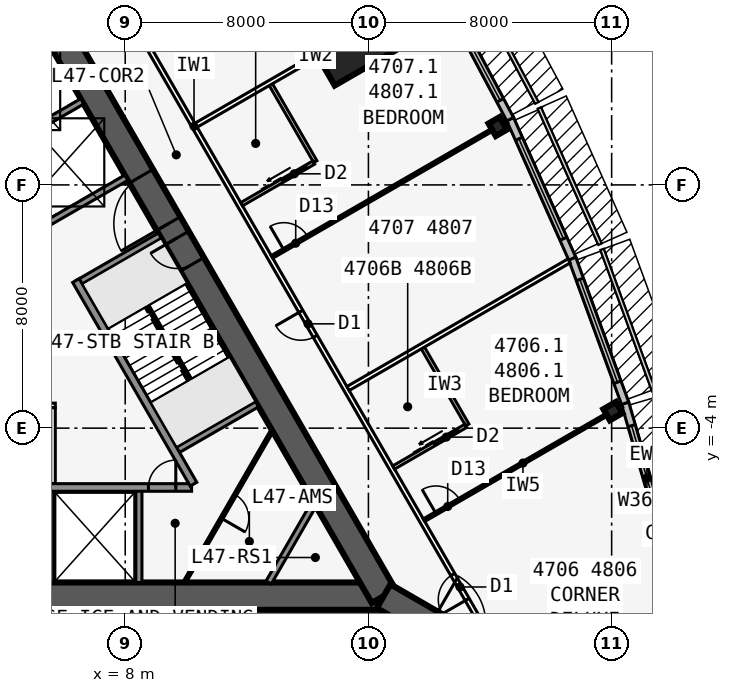
"""IFC4 building model, lengths in metres.
Left out: names, types, materials, properties, quantities, classifications, styles, units other than length and angle.
Written with IfcOpenShell. Run it as: python <this file> out.ifc"""

import sys

from ifc_helpers import new_model, si_unit, direction, frame, frame_2d, origin, origin_2d, place, context, subcontext, project, spatial, rectangle, i_section, extrude, element, fill, save


model = new_model("IFC4")
c1 = context("Model", 3, precision=1e-05, world=origin(), true_north=direction((0.0, 1.0)))
c2 = subcontext(c1, "Body", "Model", "MODEL_VIEW")
j1 = project(units=[si_unit("LENGTHUNIT", "METRE"), si_unit("PLANEANGLEUNIT", "RADIAN")], contexts=[c1])
p1 = place(None, origin())
s1 = spatial("IfcSite", under=j1, at=p1, CompositionType="ELEMENT")
p2 = place(p1, origin())
s2 = spatial("IfcBuilding", under=s1, at=p2, CompositionType="ELEMENT")
p3 = place(p2, frame((0.0, 0.0, 175.9)))
s3 = spatial("IfcBuildingStorey", under=s2, at=p3, CompositionType="ELEMENT", Elevation=175.9)
p4 = place(p3, frame((-16.5, -9.526, 0.0), z_axis=(0.0, 0.0, 1.0), x_axis=(1.0, 0.0, 0.0)))
e1 = element("IfcWall", 1, at=p4, inside=s3, PredefinedType="SHEAR", context=c2, shape_type="SweptSolid", body=[
    extrude(rectangle(XDim=33.0, YDim=0.9, at=frame_2d((16.5, 0.0))), origin(), (0.0, 0.0, 1.0), 3.4),
])
p5 = place(p4, frame((14.05, 0.0, 0.0)))
e2 = element("IfcOpeningElement", 2, at=p5, cuts=e1, PredefinedType="OPENING", context=c2, shape_type="SweptSolid", body=[
    extrude(rectangle(XDim=1.8, YDim=2.13, at=frame_2d((0.9, 1.065))), frame((0.0, 0.46, 0.0), z_axis=(0.0, -1.0, 0.0), x_axis=(1.0, 0.0, 0.0)), (0.0, 0.0, 1.0), 0.92),
])
p6 = place(p3, frame((-0.55, -5.951, 0.0), z_axis=(0.0, 0.0, 1.0), x_axis=(1.0, 0.0, 0.0)))
e3 = element("IfcWall", 3, at=p6, inside=s3, PredefinedType="SOLIDWALL", context=c2, shape_type="SweptSolid", body=[
    extrude(rectangle(XDim=10.733, YDim=0.25, at=frame_2d((5.366, 0.0))), origin(), (0.0, 0.0, 1.0), 3.235),
])
p7 = place(p6, frame((9.314, 0.0, 0.0)))
e4 = element("IfcOpeningElement", 4, at=p7, cuts=e3, PredefinedType="OPENING", context=c2, shape_type="SweptSolid", body=[
    extrude(rectangle(XDim=0.9, YDim=2.13, at=frame_2d((0.45, 1.065))), frame((0.0, 0.135, 0.0), z_axis=(0.0, -1.0, 0.0), x_axis=(1.0, 0.0, 0.0)), (0.0, 0.0, 1.0), 0.27),
])
p8 = place(p6, frame((1.05, 0.0, 0.0)))
e5 = element("IfcOpeningElement", 5, at=p8, cuts=e3, PredefinedType="OPENING", context=c2, shape_type="SweptSolid", body=[
    extrude(rectangle(XDim=1.1, YDim=2.13, at=frame_2d((0.55, 1.065))), frame((0.0, 0.135, 0.0), z_axis=(0.0, -1.0, 0.0), x_axis=(1.0, 0.0, 0.0)), (0.0, 0.0, 1.0), 0.27),
])
p9 = place(p6, frame((4.05, 0.0, 0.0)))
e6 = element("IfcOpeningElement", 6, at=p9, cuts=e3, PredefinedType="OPENING", context=c2, shape_type="SweptSolid", body=[
    extrude(rectangle(XDim=1.1, YDim=2.13, at=frame_2d((0.55, 1.065))), frame((0.0, 0.135, 0.0), z_axis=(0.0, -1.0, 0.0), x_axis=(1.0, 0.0, 0.0)), (0.0, 0.0, 1.0), 0.27),
])
for number, where, z_axis, x_axis in (
    (7, (5.55, -5.951, 0.0), (0.0, 0.0, 1.0), (0.0, -1.0, 0.0)),
    (8, (8.45, -5.951, 0.0), (0.0, 0.0, 1.0), (0.0, -1.0, 0.0)),
):
    element("IfcWall", number, at=place(p3, frame(where, z_axis=z_axis, x_axis=x_axis)), inside=s3, PredefinedType="SOLIDWALL", context=c2, shape_type="SweptSolid", body=[
        extrude(rectangle(XDim=3.125, YDim=0.2, at=frame_2d((1.562, 0.0))), origin(), (0.0, 0.0, 1.0), 3.235),
    ])
p10 = place(p3, frame((16.5, -9.526, 0.0), z_axis=(0.0, 0.0, 1.0), x_axis=(-0.499999749417, 0.866025548458, 0.0)))
e9 = element("IfcWall", 9, at=p10, inside=s3, PredefinedType="SHEAR", context=c2, shape_type="SweptSolid", body=[
    extrude(rectangle(XDim=33.0, YDim=0.9, at=frame_2d((16.5, 0.0))), origin(), (0.0, 0.0, 1.0), 3.4),
])
p11 = place(p10, frame((14.15, 0.0, 0.0)))
e10 = element("IfcOpeningElement", 10, at=p11, cuts=e9, PredefinedType="OPENING", context=c2, shape_type="SweptSolid", body=[
    extrude(rectangle(XDim=1.8, YDim=2.13, at=frame_2d((0.9, 1.065))), frame((0.0, 0.46, 0.0), z_axis=(0.0, -1.0, 0.0), x_axis=(1.0, 0.0, 0.0)), (0.0, 0.0, 1.0), 0.92),
])
p12 = place(p10, frame((12.6, 0.0, 0.0)))
e11 = element("IfcOpeningElement", 11, at=p12, cuts=e9, PredefinedType="OPENING", context=c2, shape_type="SweptSolid", body=[
    extrude(rectangle(XDim=1.0, YDim=2.13, at=frame_2d((0.5, 1.065))), frame((0.0, 0.46, 0.0), z_axis=(0.0, -1.0, 0.0), x_axis=(1.0, 0.0, 0.0)), (0.0, 0.0, 1.0), 0.92),
])
p13 = place(p3, frame((10.245, -5.843, 0.0), z_axis=(0.0, 0.0, 1.0), x_axis=(-0.499993009313, 0.866029439822, 0.0)))
e12 = element("IfcWall", 12, at=p13, inside=s3, PredefinedType="SOLIDWALL", context=c2, shape_type="SweptSolid", body=[
    extrude(rectangle(XDim=7.733, YDim=0.25, at=frame_2d((3.866, 0.0))), origin(), (0.0, 0.0, 1.0), 3.235),
])
for number, where, z_axis, x_axis in (
    (13, (9.629, -4.775, 0.0), (0.0, 0.0, 1.0), (0.866, 0.5, 0.0)),
    (14, (6.429, 0.767, 0.0), (0.0, 0.0, 1.0), (0.866, 0.5, 0.0)),
    (15, (5.329, 2.673, 0.0), (0.0, 0.0, 1.0), (0.866, 0.5, 0.0)),
    (16, (3.879, 5.184, 0.0), (0.0, 0.0, 1.0), (0.866, 0.5, 0.0)),
):
    element("IfcWall", number, at=place(p3, frame(where, z_axis=z_axis, x_axis=x_axis)), inside=s3, PredefinedType="SOLIDWALL", context=c2, shape_type="SweptSolid", body=[
        extrude(rectangle(XDim=3.125, YDim=0.2, at=frame_2d((1.562, 0.0))), origin(), (0.0, 0.0, 1.0), 3.235),
    ])
p14 = place(p3, frame((16.5, -9.526, 0.0), z_axis=(0.0, 0.0, 1.0), x_axis=(0.866031398331, -0.499989616998, 0.0)))
e17 = element("IfcWall", 17, at=p14, inside=s3, PredefinedType="SHEAR", context=c2, shape_type="SweptSolid", body=[
    extrude(rectangle(XDim=4.746, YDim=0.9, at=frame_2d((2.373, 0.0))), origin(), (0.0, 0.0, 1.0), 3.4),
])
p15 = place(p14, frame((1.8, 0.0, 0.0)))
e18 = element("IfcOpeningElement", 18, at=p15, cuts=e17, PredefinedType="OPENING", context=c2, shape_type="SweptSolid", body=[
    extrude(rectangle(XDim=1.8, YDim=2.13, at=frame_2d((0.9, 1.065))), frame((0.0, 0.46, 0.0), z_axis=(0.0, -1.0, 0.0), x_axis=(1.0, 0.0, 0.0)), (0.0, 0.0, 1.0), 0.92),
])
for number, where, z_axis, x_axis in (
    (19, (24.041, -3.44, 0.0), (0.0, 0.0, 1.0), (-0.5, 0.866, 0.0)),
    (20, (20.254, 5.92, 0.0), (0.0, 0.0, 1.0), (0.866, 0.5, 0.0)),
):
    element("IfcColumn", number, at=place(p3, frame(where, z_axis=z_axis, x_axis=x_axis)), inside=s3, PredefinedType="COLUMN", context=c2, shape_type="SweptSolid", body=[
        extrude(i_section(OverallWidth=0.424, OverallDepth=0.475, WebThickness=0.048, FlangeThickness=0.077, at=origin_2d()), origin(), (0.0, 0.0, 1.0), 3.4),
    ])
p16 = place(p3, frame((15.312, 8.84, 0.0), z_axis=(0.0, 0.0, 1.0), x_axis=(0.866025403784, 0.5, 0.0)))
e21 = element("IfcColumn", 21, at=p16, inside=s3, PredefinedType="COLUMN", context=c2, shape_type="SweptSolid", body=[
    extrude(rectangle(XDim=2.3, YDim=2.3, at=origin_2d()), origin(), (0.0, 0.0, 1.0), 3.4),
])
p17 = place(p3, frame((25.88, -8.118, 0.0), z_axis=(0.0, 0.0, 1.0), x_axis=(-0.279528287117, 0.960137457191, 0.0)))
e22 = element("IfcWall", 22, at=p17, inside=s3, PredefinedType="STANDARD", context=c2, shape_type="SweptSolid", body=[
    extrude(rectangle(XDim=5.148, YDim=0.25, at=frame_2d((2.574, 0.0))), origin(), (0.0, 0.0, 1.0), 3.235),
])
p18 = place(p17, frame((0.774, 0.0, 0.45)))
e23 = element("IfcOpeningElement", 23, at=p18, cuts=e22, PredefinedType="OPENING", context=c2, shape_type="SweptSolid", body=[
    extrude(rectangle(XDim=3.6, YDim=2.4, at=frame_2d((1.8, 1.2))), frame((0.0, 0.135, 0.0), z_axis=(0.0, -1.0, 0.0), x_axis=(1.0, 0.0, 0.0)), (0.0, 0.0, 1.0), 0.27),
])
p19 = place(p3, frame((24.444, -3.183, 0.0), z_axis=(0.0, 0.0, 1.0), x_axis=(-0.343225593282, 0.939252996863, 0.0)))
e24 = element("IfcWall", 24, at=p19, inside=s3, PredefinedType="STANDARD", context=c2, shape_type="SweptSolid", body=[
    extrude(rectangle(XDim=5.076, YDim=0.25, at=frame_2d((2.538, 0.0))), origin(), (0.0, 0.0, 1.0), 3.235),
])
p20 = place(p19, frame((0.738, 0.0, 0.45)))
e25 = element("IfcOpeningElement", 25, at=p20, cuts=e24, PredefinedType="OPENING", context=c2, shape_type="SweptSolid", body=[
    extrude(rectangle(XDim=3.6, YDim=2.4, at=frame_2d((1.8, 1.2))), frame((0.0, 0.135, 0.0), z_axis=(0.0, -1.0, 0.0), x_axis=(1.0, 0.0, 0.0)), (0.0, 0.0, 1.0), 0.27),
])
p21 = place(p3, frame((22.705, 1.576, 0.0), z_axis=(0.0, 0.0, 1.0), x_axis=(-0.406832200364, 0.913502906808, 0.0)))
e26 = element("IfcWall", 26, at=p21, inside=s3, PredefinedType="STANDARD", context=c2, shape_type="SweptSolid", body=[
    extrude(rectangle(XDim=5.028, YDim=0.25, at=frame_2d((2.514, 0.0))), origin(), (0.0, 0.0, 1.0), 3.235),
])
p22 = place(p21, frame((0.714, 0.0, 0.45)))
e27 = element("IfcOpeningElement", 27, at=p22, cuts=e26, PredefinedType="OPENING", context=c2, shape_type="SweptSolid", body=[
    extrude(rectangle(XDim=3.6, YDim=2.4, at=frame_2d((1.8, 1.2))), frame((0.0, 0.135, 0.0), z_axis=(0.0, -1.0, 0.0), x_axis=(1.0, 0.0, 0.0)), (0.0, 0.0, 1.0), 0.27),
])
p23 = place(p3, frame((20.663, 6.161, 0.0), z_axis=(0.0, 0.0, 1.0), x_axis=(-0.469404966864, 0.882982999317, 0.0)))
e28 = element("IfcWall", 28, at=p23, inside=s3, PredefinedType="STANDARD", context=c2, shape_type="SweptSolid", body=[
    extrude(rectangle(XDim=5.003, YDim=0.25, at=frame_2d((2.501, 0.0))), origin(), (0.0, 0.0, 1.0), 3.235),
])
p24 = place(p23, frame((0.701, 0.0, 0.45)))
e29 = element("IfcOpeningElement", 29, at=p24, cuts=e28, PredefinedType="OPENING", context=c2, shape_type="SweptSolid", body=[
    extrude(rectangle(XDim=3.6, YDim=2.4, at=frame_2d((1.8, 1.2))), frame((0.0, 0.135, 0.0), z_axis=(0.0, -1.0, 0.0), x_axis=(1.0, 0.0, 0.0)), (0.0, 0.0, 1.0), 0.27),
])
p25 = place(p3, frame((20.027, -10.985, 0.0), z_axis=(0.0, 0.0, 1.0), x_axis=(-0.500001677587, 0.866024435227, 0.0)))
e30 = element("IfcWall", 30, at=p25, inside=s3, PredefinedType="PARTITIONING", context=c2, shape_type="SweptSolid", body=[
    extrude(rectangle(XDim=39.054, YDim=0.15, at=frame_2d((19.527, 0.0))), origin(), (0.0, 0.0, 1.0), 3.235),
])
p26 = place(p25, frame((1.558, 0.0, 0.0)))
e31 = element("IfcOpeningElement", 31, at=p26, cuts=e30, PredefinedType="OPENING", context=c2, shape_type="SweptSolid", body=[
    extrude(rectangle(XDim=0.95, YDim=2.13, at=frame_2d((0.475, 1.065))), frame((0.0, 0.085, 0.0), z_axis=(0.0, -1.0, 0.0), x_axis=(1.0, 0.0, 0.0)), (0.0, 0.0, 1.0), 0.17),
])
p27 = place(p25, frame((11.552, 0.0, 0.0)))
e32 = element("IfcOpeningElement", 32, at=p27, cuts=e30, PredefinedType="OPENING", context=c2, shape_type="SweptSolid", body=[
    extrude(rectangle(XDim=0.95, YDim=2.13, at=frame_2d((0.475, 1.065))), frame((0.0, 0.085, 0.0), z_axis=(0.0, -1.0, 0.0), x_axis=(1.0, 0.0, 0.0)), (0.0, 0.0, 1.0), 0.17),
])
p28 = place(p25, frame((25.352, 0.0, 0.0)))
e33 = element("IfcOpeningElement", 33, at=p28, cuts=e30, PredefinedType="OPENING", context=c2, shape_type="SweptSolid", body=[
    extrude(rectangle(XDim=0.95, YDim=2.13, at=frame_2d((0.475, 1.065))), frame((0.0, 0.085, 0.0), z_axis=(0.0, -1.0, 0.0), x_axis=(1.0, 0.0, 0.0)), (0.0, 0.0, 1.0), 0.17),
])
p29 = place(p25, frame((36.546, 0.0, 0.0)))
e34 = element("IfcOpeningElement", 34, at=p29, cuts=e30, PredefinedType="OPENING", context=c2, shape_type="SweptSolid", body=[
    extrude(rectangle(XDim=0.95, YDim=2.13, at=frame_2d((0.475, 1.065))), frame((0.0, 0.085, 0.0), z_axis=(0.0, -1.0, 0.0), x_axis=(1.0, 0.0, 0.0)), (0.0, 0.0, 1.0), 0.17),
])
p30 = place(p3, frame((17.829, -7.027, 0.0), z_axis=(0.0, 0.0, 1.0), x_axis=(0.866029804378, 0.499992377871, 0.0)))
e35 = element("IfcWall", 35, at=p30, inside=s3, PredefinedType="PARTITIONING", context=c2, shape_type="SweptSolid", body=[
    extrude(rectangle(XDim=7.516, YDim=0.1, at=frame_2d((3.758, 0.0))), origin(), (0.0, 0.0, 1.0), 2.389),
])
p31 = place(p30, frame((0.45, 0.0, 0.0)))
e36 = element("IfcOpeningElement", 36, at=p31, cuts=e35, PredefinedType="OPENING", context=c2, shape_type="SweptSolid", body=[
    extrude(rectangle(XDim=0.9, YDim=2.13, at=frame_2d((0.45, 1.065))), frame((0.0, 0.06, 0.0), z_axis=(0.0, -1.0, 0.0), x_axis=(1.0, 0.0, 0.0)), (0.0, 0.0, 1.0), 0.12),
])
p32 = place(p3, frame((15.329, -2.697, 0.0), z_axis=(0.0, 0.0, 1.0), x_axis=(0.866024316602, 0.50000188305, 0.0)))
e37 = element("IfcWall", 37, at=p32, inside=s3, PredefinedType="PARTITIONING", context=c2, shape_type="SweptSolid", body=[
    extrude(rectangle(XDim=8.395, YDim=0.15, at=frame_2d((4.198, 0.0))), origin(), (0.0, 0.0, 1.0), 2.389),
])
p33 = place(p3, frame((12.829, 1.633, 0.0), z_axis=(0.0, 0.0, 1.0), x_axis=(0.866027015393, 0.499997208602, 0.0)))
e38 = element("IfcWall", 38, at=p33, inside=s3, PredefinedType="PARTITIONING", context=c2, shape_type="SweptSolid", body=[
    extrude(rectangle(XDim=8.922, YDim=0.1, at=frame_2d((4.461, 0.0))), origin(), (0.0, 0.0, 1.0), 2.389),
])
p34 = place(p33, frame((0.45, 0.0, 0.0)))
e39 = element("IfcOpeningElement", 39, at=p34, cuts=e38, PredefinedType="OPENING", context=c2, shape_type="SweptSolid", body=[
    extrude(rectangle(XDim=0.9, YDim=2.13, at=frame_2d((0.45, 1.065))), frame((0.0, 0.06, 0.0), z_axis=(0.0, -1.0, 0.0), x_axis=(1.0, 0.0, 0.0)), (0.0, 0.0, 1.0), 0.12),
])
p35 = place(p3, frame((10.329, 5.963, 0.0), z_axis=(0.0, 0.0, 1.0), x_axis=(0.866025170687, 0.500000403736, 0.0)))
e40 = element("IfcWall", 40, at=p35, inside=s3, PredefinedType="PARTITIONING", context=c2, shape_type="SweptSolid", body=[
    extrude(rectangle(XDim=9.099, YDim=0.15, at=frame_2d((4.549, 0.0))), origin(), (0.0, 0.0, 1.0), 2.389),
])
p36 = place(p3, frame((19.253, -3.895, 0.0), z_axis=(0.0, 0.0, 1.0), x_axis=(-0.499990139034, 0.866031096941, 0.0)))
e41 = element("IfcWall", 41, at=p36, inside=s3, PredefinedType="PLUMBINGWALL", context=c2, shape_type="SweptSolid", body=[
    extrude(rectangle(XDim=3.0, YDim=0.12, at=frame_2d((1.5, 0.0))), origin(), (0.0, 0.0, 1.0), 3.235),
])
p37 = place(p3, frame((16.829, -5.295, 0.0), z_axis=(0.0, 0.0, 1.0), x_axis=(0.866035715982, 0.499982138324, 0.0)))
e42 = element("IfcWall", 42, at=p37, inside=s3, PredefinedType="PLUMBINGWALL", context=c2, shape_type="SweptSolid", body=[
    extrude(rectangle(XDim=2.74, YDim=0.12, at=frame_2d((1.37, 0.0))), origin(), (0.0, 0.0, 1.0), 3.235),
])
p38 = place(p37, frame((1.55, 0.0, 0.0)))
e43 = element("IfcOpeningElement", 43, at=p38, cuts=e42, PredefinedType="OPENING", context=c2, shape_type="SweptSolid", body=[
    extrude(rectangle(XDim=0.9, YDim=2.13, at=frame_2d((0.45, 1.065))), frame((0.0, 0.07, 0.0), z_axis=(0.0, -1.0, 0.0), x_axis=(1.0, 0.0, 0.0)), (0.0, 0.0, 1.0), 0.14),
])
p39 = place(p3, frame((14.253, 4.765, 0.0), z_axis=(0.0, 0.0, 1.0), x_axis=(-0.50002537861, 0.866010750942, 0.0)))
e44 = element("IfcWall", 44, at=p39, inside=s3, PredefinedType="PLUMBINGWALL", context=c2, shape_type="SweptSolid", body=[
    extrude(rectangle(XDim=3.0, YDim=0.12, at=frame_2d((1.5, 0.0))), origin(), (0.0, 0.0, 1.0), 3.235),
])
p40 = place(p3, frame((11.829, 3.365, 0.0), z_axis=(0.0, 0.0, 1.0), x_axis=(0.865997131366, 0.500048966069, 0.0)))
e45 = element("IfcWall", 45, at=p40, inside=s3, PredefinedType="PLUMBINGWALL", context=c2, shape_type="SweptSolid", body=[
    extrude(rectangle(XDim=2.74, YDim=0.12, at=frame_2d((1.37, 0.0))), origin(), (0.0, 0.0, 1.0), 3.235),
])
p41 = place(p40, frame((1.55, 0.0, 0.0)))
e46 = element("IfcOpeningElement", 46, at=p41, cuts=e45, PredefinedType="OPENING", context=c2, shape_type="SweptSolid", body=[
    extrude(rectangle(XDim=0.9, YDim=2.13, at=frame_2d((0.45, 1.065))), frame((0.0, 0.07, 0.0), z_axis=(0.0, -1.0, 0.0), x_axis=(1.0, 0.0, 0.0)), (0.0, 0.0, 1.0), 0.14),
])
p42 = place(p3, frame((-2.65, -3.251, 0.0), z_axis=(0.0, 0.0, 1.0), x_axis=(1.0, 0.0, 0.0)))
e47 = element("IfcWall", 47, at=p42, inside=s3, PredefinedType="PARTITIONING", context=c2, shape_type="SweptSolid", body=[
    extrude(rectangle(XDim=8.35, YDim=0.15, at=frame_2d((4.175, 0.0))), origin(), (0.0, 0.0, 1.0), 3.235),
])
p43 = place(p3, frame((5.625, -5.826, 0.0), z_axis=(0.0, 0.0, 1.0), x_axis=(0.0, 1.0, 0.0)))
e48 = element("IfcWall", 48, at=p43, inside=s3, PredefinedType="PARTITIONING", context=c2, shape_type="SweptSolid", body=[
    extrude(rectangle(XDim=2.5, YDim=0.15, at=frame_2d((1.25, 0.0))), origin(), (0.0, 0.0, 1.0), 3.235),
])
p44 = place(p3, frame((14.219, -6.476, 0.0), z_axis=(0.0, 0.0, 1.0), x_axis=(-0.499952404951, -0.866052881055, 0.0)))
e49 = element("IfcWall", 49, at=p44, inside=s3, PredefinedType="SOLIDWALL", context=c2, shape_type="SweptSolid", body=[
    extrude(rectangle(XDim=3.002, YDim=0.2, at=frame_2d((1.501, 0.0))), origin(), (0.0, 0.0, 1.0), 3.235),
])
p45 = place(p3, frame((12.834, -4.076, 0.0), z_axis=(0.0, 0.0, 1.0), x_axis=(-0.500027479704, -0.866009537788, 0.0)))
e50 = element("IfcWall", 50, at=p45, inside=s3, PredefinedType="PARTITIONING", context=c2, shape_type="SweptSolid", body=[
    extrude(rectangle(XDim=5.774, YDim=0.1, at=frame_2d((2.887, 0.0))), origin(), (0.0, 0.0, 1.0), 3.235),
])
p46 = place(p45, frame((2.437, 0.0, 0.0)))
e51 = element("IfcOpeningElement", 51, at=p46, cuts=e50, PredefinedType="OPENING", context=c2, shape_type="SweptSolid", body=[
    extrude(rectangle(XDim=0.9, YDim=2.13, at=frame_2d((0.45, 1.065))), frame((0.0, 0.06, 0.0), z_axis=(0.0, -1.0, 0.0), x_axis=(1.0, 0.0, 0.0)), (0.0, 0.0, 1.0), 0.12),
])
p47 = place(p3, frame((10.135, -2.401, 0.0), z_axis=(0.0, 0.0, 1.0), x_axis=(-0.499992232847, 0.866029888106, 0.0)))
e52 = element("IfcWall", 52, at=p47, inside=s3, PredefinedType="SOLIDWALL", context=c2, shape_type="SweptSolid", body=[
    extrude(rectangle(XDim=2.794, YDim=0.1, at=frame_2d((1.397, 0.0))), origin(), (0.0, 0.0, 1.0), 3.4),
])
p48 = place(p18, origin())
e53 = element("IfcWindow", 53, at=p48, inside=s3, PartitioningType="SINGLE_PANEL", PredefinedType="WINDOW", context=c2, shape_type="SweptSolid", body=[
    extrude(rectangle(XDim=3.6, YDim=2.4, at=frame_2d((1.8, 1.2))), frame((0.0, 0.03, 0.0), z_axis=(0.0, -1.0, 0.0), x_axis=(1.0, 0.0, 0.0)), (0.0, 0.0, 1.0), 0.06),
])
fill(e23, e53)
p49 = place(p20, origin())
e54 = element("IfcWindow", 54, at=p49, inside=s3, PartitioningType="SINGLE_PANEL", PredefinedType="WINDOW", context=c2, shape_type="SweptSolid", body=[
    extrude(rectangle(XDim=3.6, YDim=2.4, at=frame_2d((1.8, 1.2))), frame((0.0, 0.03, 0.0), z_axis=(0.0, -1.0, 0.0), x_axis=(1.0, 0.0, 0.0)), (0.0, 0.0, 1.0), 0.06),
])
fill(e25, e54)
p50 = place(p22, origin())
e55 = element("IfcWindow", 55, at=p50, inside=s3, PartitioningType="SINGLE_PANEL", PredefinedType="WINDOW", context=c2, shape_type="SweptSolid", body=[
    extrude(rectangle(XDim=3.6, YDim=2.4, at=frame_2d((1.8, 1.2))), frame((0.0, 0.03, 0.0), z_axis=(0.0, -1.0, 0.0), x_axis=(1.0, 0.0, 0.0)), (0.0, 0.0, 1.0), 0.06),
])
fill(e27, e55)
p51 = place(p24, origin())
e56 = element("IfcWindow", 56, at=p51, inside=s3, PartitioningType="SINGLE_PANEL", PredefinedType="WINDOW", context=c2, shape_type="SweptSolid", body=[
    extrude(rectangle(XDim=3.6, YDim=2.4, at=frame_2d((1.8, 1.2))), frame((0.0, 0.03, 0.0), z_axis=(0.0, -1.0, 0.0), x_axis=(1.0, 0.0, 0.0)), (0.0, 0.0, 1.0), 0.06),
])
fill(e29, e56)
p52 = place(p31, origin())
e57 = element("IfcDoor", 57, at=p52, inside=s3, OperationType="SINGLE_SWING_LEFT", PredefinedType="DOOR", context=c2, shape_type="SweptSolid", body=[
    extrude(rectangle(XDim=0.9, YDim=2.13, at=frame_2d((0.45, 1.065))), frame((0.0, 0.025, 0.0), z_axis=(0.0, -1.0, 0.0), x_axis=(1.0, 0.0, 0.0)), (0.0, 0.0, 1.0), 0.05),
])
fill(e36, e57)
p53 = place(p34, origin())
e58 = element("IfcDoor", 58, at=p53, inside=s3, OperationType="SINGLE_SWING_LEFT", PredefinedType="DOOR", context=c2, shape_type="SweptSolid", body=[
    extrude(rectangle(XDim=0.9, YDim=2.13, at=frame_2d((0.45, 1.065))), frame((0.0, 0.025, 0.0), z_axis=(0.0, -1.0, 0.0), x_axis=(1.0, 0.0, 0.0)), (0.0, 0.0, 1.0), 0.05),
])
fill(e39, e58)
p54 = place(p26, origin())
e59 = element("IfcDoor", 59, at=p54, inside=s3, OperationType="SINGLE_SWING_LEFT", PredefinedType="DOOR", context=c2, shape_type="SweptSolid", body=[
    extrude(rectangle(XDim=0.95, YDim=2.13, at=frame_2d((0.475, 1.065))), frame((0.0, 0.025, 0.0), z_axis=(0.0, -1.0, 0.0), x_axis=(1.0, 0.0, 0.0)), (0.0, 0.0, 1.0), 0.05),
])
fill(e31, e59)
p55 = place(p38, origin())
e60 = element("IfcDoor", 60, at=p55, inside=s3, OperationType="SLIDING_TO_LEFT", PredefinedType="DOOR", context=c2, shape_type="SweptSolid", body=[
    extrude(rectangle(XDim=0.9, YDim=2.13, at=frame_2d((0.45, 1.065))), frame((0.0, 0.025, 0.0), z_axis=(0.0, -1.0, 0.0), x_axis=(1.0, 0.0, 0.0)), (0.0, 0.0, 1.0), 0.05),
])
fill(e43, e60)
p56 = place(p27, origin())
e61 = element("IfcDoor", 61, at=p56, inside=s3, OperationType="SINGLE_SWING_RIGHT", PredefinedType="DOOR", context=c2, shape_type="SweptSolid", body=[
    extrude(rectangle(XDim=0.95, YDim=2.13, at=frame_2d((0.475, 1.065))), frame((0.0, 0.025, 0.0), z_axis=(0.0, -1.0, 0.0), x_axis=(1.0, 0.0, 0.0)), (0.0, 0.0, 1.0), 0.05),
])
fill(e32, e61)
p57 = place(p41, origin())
e62 = element("IfcDoor", 62, at=p57, inside=s3, OperationType="SLIDING_TO_LEFT", PredefinedType="DOOR", context=c2, shape_type="SweptSolid", body=[
    extrude(rectangle(XDim=0.9, YDim=2.13, at=frame_2d((0.45, 1.065))), frame((0.0, 0.025, 0.0), z_axis=(0.0, -1.0, 0.0), x_axis=(1.0, 0.0, 0.0)), (0.0, 0.0, 1.0), 0.05),
])
fill(e46, e62)
p58 = place(p11, origin())
e63 = element("IfcDoor", 63, at=p58, inside=s3, OperationType="DOUBLE_DOOR_SINGLE_SWING", PredefinedType="DOOR", context=c2, shape_type="SweptSolid", body=[
    extrude(rectangle(XDim=1.8, YDim=2.13, at=frame_2d((0.9, 1.065))), frame((0.0, 0.025, 0.0), z_axis=(0.0, -1.0, 0.0), x_axis=(1.0, 0.0, 0.0)), (0.0, 0.0, 1.0), 0.05),
])
fill(e10, e63)
p59 = place(p12, origin())
e64 = element("IfcDoor", 64, at=p59, inside=s3, OperationType="SINGLE_SWING_RIGHT", PredefinedType="DOOR", context=c2, shape_type="SweptSolid", body=[
    extrude(rectangle(XDim=1.0, YDim=2.13, at=frame_2d((0.5, 1.065))), frame((0.0, 0.025, 0.0), z_axis=(0.0, -1.0, 0.0), x_axis=(1.0, 0.0, 0.0)), (0.0, 0.0, 1.0), 0.05),
])
fill(e11, e64)
p60 = place(p46, origin())
e65 = element("IfcDoor", 65, at=p60, inside=s3, OperationType="SINGLE_SWING_RIGHT", PredefinedType="DOOR", context=c2, shape_type="SweptSolid", body=[
    extrude(rectangle(XDim=0.9, YDim=2.13, at=frame_2d((0.45, 1.065))), frame((0.0, 0.025, 0.0), z_axis=(0.0, -1.0, 0.0), x_axis=(1.0, 0.0, 0.0)), (0.0, 0.0, 1.0), 0.05),
])
fill(e51, e65)
p61 = place(p7, origin())
e66 = element("IfcDoor", 66, at=p61, inside=s3, OperationType="SINGLE_SWING_RIGHT", PredefinedType="DOOR", context=c2, shape_type="SweptSolid", body=[
    extrude(rectangle(XDim=0.9, YDim=2.13, at=frame_2d((0.45, 1.065))), frame((0.0, 0.025, 0.0), z_axis=(0.0, -1.0, 0.0), x_axis=(1.0, 0.0, 0.0)), (0.0, 0.0, 1.0), 0.05),
])
fill(e4, e66)
save(model, sys.argv[1])
